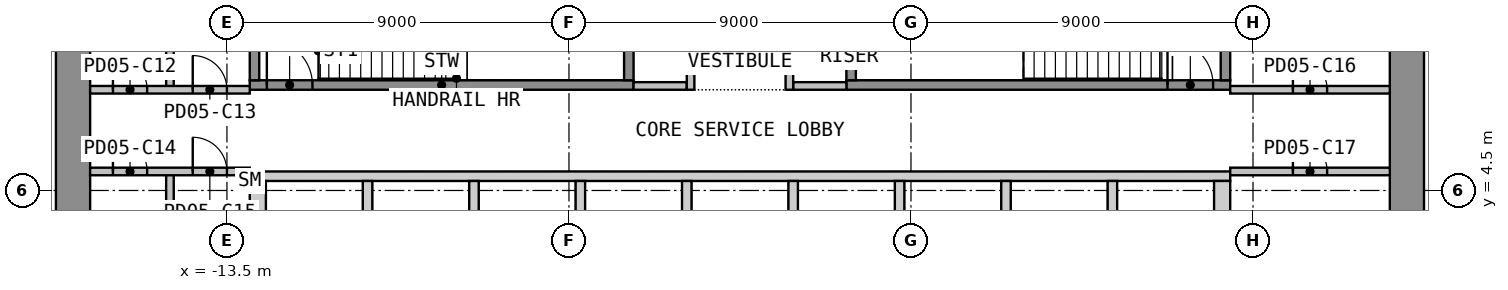
"""IFC4 building model, lengths in metres.
Left out: names, types, materials, properties, quantities, classifications, styles, units other than length and angle.
Written with IfcOpenShell. Run it as: python <this file> out.ifc"""

import sys

from ifc_helpers import new_model, si_unit, direction, frame, frame_2d, origin, place, context, subcontext, project, spatial, polyline, rectangle, outline, extrude, element, fill, save


model = new_model("IFC4")
c1 = context("Model", 3, precision=1e-05, world=origin(), true_north=direction((0.0, 1.0)))
c2 = subcontext(c1, "Body", "Model", "MODEL_VIEW")
j1 = project(units=[si_unit("LENGTHUNIT", "METRE"), si_unit("PLANEANGLEUNIT", "RADIAN")], contexts=[c1])
p1 = place(None, origin())
s1 = spatial("IfcSite", under=j1, at=p1, CompositionType="ELEMENT")
p2 = place(p1, origin())
s2 = spatial("IfcBuilding", under=s1, at=p2, CompositionType="ELEMENT")
p3 = place(p2, frame((0.0, 0.0, 25.2)))
s3 = spatial("IfcBuildingStorey", under=s2, at=p3, CompositionType="ELEMENT", Elevation=25.2)
p4 = place(p3, frame((-17.55, -12.6, 0.0), z_axis=(0.0, 0.0, 1.0), x_axis=(0.0, 1.0, 0.0)))
e1 = element("IfcWall", 1, at=p4, inside=s3, PredefinedType="SHEAR", context=c2, shape_type="SweptSolid", body=[
    extrude(rectangle(XDim=25.2, YDim=0.9, at=frame_2d((12.6, 0.0))), origin(), (0.0, 0.0, 1.0), 4.425),
])
p5 = place(p4, frame((11.4, 0.0, 0.0)))
e2 = element("IfcOpeningElement", 2, at=p5, cuts=e1, PredefinedType="OPENING", context=c2, shape_type="SweptSolid", body=[
    extrude(rectangle(XDim=2.4, YDim=2.1, at=frame_2d((1.2, 1.05))), frame((0.0, 0.46, 0.0), z_axis=(0.0, -1.0, 0.0), x_axis=(1.0, 0.0, 0.0)), (0.0, 0.0, 1.0), 0.92),
])
p6 = place(p3, frame((17.55, -12.6, 0.0), z_axis=(0.0, 0.0, 1.0), x_axis=(0.0, 1.0, 0.0)))
e3 = element("IfcWall", 3, at=p6, inside=s3, PredefinedType="SHEAR", context=c2, shape_type="SweptSolid", body=[
    extrude(rectangle(XDim=25.2, YDim=0.9, at=frame_2d((12.6, 0.0))), origin(), (0.0, 0.0, 1.0), 4.425),
])
p7 = place(p6, frame((11.4, 0.0, 0.0)))
e4 = element("IfcOpeningElement", 4, at=p7, cuts=e3, PredefinedType="OPENING", context=c2, shape_type="SweptSolid", body=[
    extrude(rectangle(XDim=2.4, YDim=2.1, at=frame_2d((1.2, 1.05))), frame((0.0, 0.46, 0.0), z_axis=(0.0, -1.0, 0.0), x_axis=(1.0, 0.0, 0.0)), (0.0, 0.0, 1.0), 0.92),
])
p8 = place(p3, origin())
e5 = element("IfcWall", 5, at=p8, inside=s3, PredefinedType="SHEAR", context=c2, shape_type="SweptSolid", body=[
    extrude(outline(polyline([(-12.9, 4.75), (12.9, 4.75), (12.9, 5.0), (-12.9, 5.0), (-12.9, 4.75)])), origin(), (0.0, 0.0, 1.0), 4.425),
])
p9 = place(p3, origin())
e6 = element("IfcWall", 6, at=p9, inside=s3, PredefinedType="SHEAR", context=c2, shape_type="SweptSolid", body=[
    extrude(outline(polyline([(-12.9, 2.05), (-12.475, 2.05), (-12.475, 4.75), (-12.9, 4.75), (-12.9, 2.05)])), origin(), (0.0, 0.0, 1.0), 4.425),
])
p10 = place(p3, origin())
e7 = element("IfcWall", 7, at=p10, inside=s3, PredefinedType="SHEAR", context=c2, shape_type="SweptSolid", body=[
    extrude(outline(polyline([(-9.925, 2.05), (-9.675, 2.05), (-9.675, 4.75), (-9.925, 4.75), (-9.925, 2.05)])), origin(), (0.0, 0.0, 1.0), 4.425),
])
p11 = place(p3, origin())
e8 = element("IfcWall", 8, at=p11, inside=s3, PredefinedType="SHEAR", context=c2, shape_type="SweptSolid", body=[
    extrude(outline(polyline([(-7.125, 2.05), (-6.875, 2.05), (-6.875, 4.75), (-7.125, 4.75), (-7.125, 2.05)])), origin(), (0.0, 0.0, 1.0), 4.425),
])
p12 = place(p3, origin())
e9 = element("IfcWall", 9, at=p12, inside=s3, PredefinedType="SHEAR", context=c2, shape_type="SweptSolid", body=[
    extrude(outline(polyline([(-4.325, 2.05), (-4.075, 2.05), (-4.075, 4.75), (-4.325, 4.75), (-4.325, 2.05)])), origin(), (0.0, 0.0, 1.0), 4.425),
])
p13 = place(p3, origin())
e10 = element("IfcWall", 10, at=p13, inside=s3, PredefinedType="SHEAR", context=c2, shape_type="SweptSolid", body=[
    extrude(outline(polyline([(-1.525, 2.05), (-1.275, 2.05), (-1.275, 4.75), (-1.525, 4.75), (-1.525, 2.05)])), origin(), (0.0, 0.0, 1.0), 4.425),
])
p14 = place(p3, origin())
e11 = element("IfcWall", 11, at=p14, inside=s3, PredefinedType="SHEAR", context=c2, shape_type="SweptSolid", body=[
    extrude(outline(polyline([(1.275, 2.05), (1.525, 2.05), (1.525, 4.75), (1.275, 4.75), (1.275, 2.05)])), origin(), (0.0, 0.0, 1.0), 4.425),
])
p15 = place(p3, origin())
e12 = element("IfcWall", 12, at=p15, inside=s3, PredefinedType="SHEAR", context=c2, shape_type="SweptSolid", body=[
    extrude(outline(polyline([(4.075, 2.05), (4.325, 2.05), (4.325, 4.75), (4.075, 4.75), (4.075, 2.05)])), origin(), (0.0, 0.0, 1.0), 4.425),
])
p16 = place(p3, origin())
e13 = element("IfcWall", 13, at=p16, inside=s3, PredefinedType="SHEAR", context=c2, shape_type="SweptSolid", body=[
    extrude(outline(polyline([(6.875, 2.05), (7.125, 2.05), (7.125, 4.75), (6.875, 4.75), (6.875, 2.05)])), origin(), (0.0, 0.0, 1.0), 4.425),
])
p17 = place(p3, origin())
e14 = element("IfcWall", 14, at=p17, inside=s3, PredefinedType="SHEAR", context=c2, shape_type="SweptSolid", body=[
    extrude(outline(polyline([(9.675, 2.05), (9.925, 2.05), (9.925, 4.75), (9.675, 4.75), (9.675, 2.05)])), origin(), (0.0, 0.0, 1.0), 4.425),
])
p18 = place(p3, origin())
e15 = element("IfcWall", 15, at=p18, inside=s3, PredefinedType="SHEAR", context=c2, shape_type="SweptSolid", body=[
    extrude(outline(polyline([(12.475, 2.05), (12.9, 2.05), (12.9, 4.75), (12.475, 4.75), (12.475, 2.05)])), origin(), (0.0, 0.0, 1.0), 4.425),
])
p19 = place(p3, frame((-12.9, 7.275, 0.0), z_axis=(0.0, 0.0, 1.0), x_axis=(1.0, 0.0, 0.0)))
e16 = element("IfcWall", 16, at=p19, inside=s3, PredefinedType="SHEAR", context=c2, shape_type="SweptSolid", body=[
    extrude(rectangle(XDim=10.1, YDim=0.25, at=frame_2d((5.05, 0.0))), origin(), (0.0, 0.0, 1.0), 4.425),
])
p20 = place(p19, frame((0.45, 0.0, 0.0)))
e17 = element("IfcOpeningElement", 17, at=p20, cuts=e16, PredefinedType="OPENING", context=c2, shape_type="SweptSolid", body=[
    extrude(rectangle(XDim=1.2, YDim=2.1, at=frame_2d((0.6, 1.05))), frame((0.0, 0.135, 0.0), z_axis=(0.0, -1.0, 0.0), x_axis=(1.0, 0.0, 0.0)), (0.0, 0.0, 1.0), 0.27),
])
for number, where, z_axis, x_axis in (
    (18, (-12.775, 7.4, 0.0), (0.0, 0.0, 1.0), (0.0, 1.0, 0.0)),
    (19, (-2.925, 7.4, 0.0), (0.0, 0.0, 1.0), (0.0, 1.0, 0.0)),
):
    element("IfcWall", number, at=place(p3, frame(where, z_axis=z_axis, x_axis=x_axis)), inside=s3, PredefinedType="SHEAR", context=c2, shape_type="SweptSolid", body=[
        extrude(rectangle(XDim=3.25, YDim=0.25, at=frame_2d((1.625, 0.0))), origin(), (0.0, 0.0, 1.0), 4.425),
    ])
p21 = place(p3, frame((2.8, 7.275, 0.0), z_axis=(0.0, 0.0, 1.0), x_axis=(1.0, 0.0, 0.0)))
e20 = element("IfcWall", 20, at=p21, inside=s3, PredefinedType="SHEAR", context=c2, shape_type="SweptSolid", body=[
    extrude(rectangle(XDim=10.1, YDim=0.25, at=frame_2d((5.05, 0.0))), origin(), (0.0, 0.0, 1.0), 4.425),
])
p22 = place(p21, frame((8.45, 0.0, 0.0)))
e21 = element("IfcOpeningElement", 21, at=p22, cuts=e20, PredefinedType="OPENING", context=c2, shape_type="SweptSolid", body=[
    extrude(rectangle(XDim=1.2, YDim=2.1, at=frame_2d((0.6, 1.05))), frame((0.0, 0.135, 0.0), z_axis=(0.0, -1.0, 0.0), x_axis=(1.0, 0.0, 0.0)), (0.0, 0.0, 1.0), 0.27),
])
for number, where, z_axis, x_axis in (
    (22, (2.925, 7.4, 0.0), (0.0, 0.0, 1.0), (0.0, 1.0, 0.0)),
    (23, (12.775, 7.4, 0.0), (0.0, 0.0, 1.0), (0.0, 1.0, 0.0)),
):
    element("IfcWall", number, at=place(p3, frame(where, z_axis=z_axis, x_axis=x_axis)), inside=s3, PredefinedType="SHEAR", context=c2, shape_type="SweptSolid", body=[
        extrude(rectangle(XDim=3.25, YDim=0.25, at=frame_2d((1.625, 0.0))), origin(), (0.0, 0.0, 1.0), 4.425),
    ])
for number, where, z_axis, x_axis in (
    (24, (-2.8, 7.25, 0.0), (0.0, 0.0, 1.0), (1.0, 0.0, 0.0)),
    (25, (1.4, 7.25, 0.0), (0.0, 0.0, 1.0), (1.0, 0.0, 0.0)),
):
    element("IfcWall", number, at=place(p3, frame(where, z_axis=z_axis, x_axis=x_axis)), inside=s3, PredefinedType="PARTITIONING", context=c2, shape_type="SweptSolid", body=[
        extrude(rectangle(XDim=1.4, YDim=0.2, at=frame_2d((0.7, 0.0))), origin(), (0.0, 0.0, 1.0), 4.425),
    ])
p23 = place(p3, frame((-1.3, 7.15, 0.0), z_axis=(0.0, 0.0, 1.0), x_axis=(0.0, 1.0, 0.0)))
e26 = element("IfcWall", 26, at=p23, inside=s3, PredefinedType="PARTITIONING", context=c2, shape_type="SweptSolid", body=[
    extrude(rectangle(XDim=5.45, YDim=0.2, at=frame_2d((2.725, 0.0))), origin(), (0.0, 0.0, 1.0), 4.425),
])
p24 = place(p23, frame((2.375, 0.0, 0.0)))
e27 = element("IfcOpeningElement", 27, at=p24, cuts=e26, PredefinedType="OPENING", context=c2, shape_type="SweptSolid", body=[
    extrude(rectangle(XDim=0.9, YDim=2.1, at=frame_2d((0.45, 1.05))), frame((0.0, 0.11, 0.0), z_axis=(0.0, -1.0, 0.0), x_axis=(1.0, 0.0, 0.0)), (0.0, 0.0, 1.0), 0.22),
])
p25 = place(p3, frame((1.3, 7.15, 0.0), z_axis=(0.0, 0.0, 1.0), x_axis=(0.0, 1.0, 0.0)))
e28 = element("IfcWall", 28, at=p25, inside=s3, PredefinedType="PARTITIONING", context=c2, shape_type="SweptSolid", body=[
    extrude(rectangle(XDim=5.45, YDim=0.2, at=frame_2d((2.725, 0.0))), origin(), (0.0, 0.0, 1.0), 4.425),
])
p26 = place(p25, frame((1.587, 0.0, 0.0)))
e29 = element("IfcOpeningElement", 29, at=p26, cuts=e28, PredefinedType="OPENING", context=c2, shape_type="SweptSolid", body=[
    extrude(rectangle(XDim=0.9, YDim=2.1, at=frame_2d((0.45, 1.05))), frame((0.0, 0.11, 0.0), z_axis=(0.0, -1.0, 0.0), x_axis=(1.0, 0.0, 0.0)), (0.0, 0.0, 1.0), 0.22),
])
p27 = place(p25, frame((4.212, 0.0, 0.0)))
e30 = element("IfcOpeningElement", 30, at=p27, cuts=e28, PredefinedType="OPENING", context=c2, shape_type="SweptSolid", body=[
    extrude(rectangle(XDim=0.9, YDim=2.1, at=frame_2d((0.45, 1.05))), frame((0.0, 0.11, 0.0), z_axis=(0.0, -1.0, 0.0), x_axis=(1.0, 0.0, 0.0)), (0.0, 0.0, 1.0), 0.22),
])
p28 = place(p3, frame((-15.0, 7.15, 0.0), z_axis=(0.0, 0.0, 1.0), x_axis=(0.0, 1.0, 0.0)))
e31 = element("IfcWall", 31, at=p28, inside=s3, PredefinedType="PARTITIONING", context=c2, shape_type="SweptSolid", body=[
    extrude(rectangle(XDim=5.45, YDim=0.2, at=frame_2d((2.725, 0.0))), origin(), (0.0, 0.0, 1.0), 4.425),
])
p29 = place(p3, frame((-17.1, 7.15, 0.0), z_axis=(0.0, 0.0, 1.0), x_axis=(1.0, 0.0, 0.0)))
e32 = element("IfcWall", 32, at=p29, inside=s3, PredefinedType="PARTITIONING", context=c2, shape_type="SweptSolid", body=[
    extrude(rectangle(XDim=4.2, YDim=0.2, at=frame_2d((2.1, 0.0))), origin(), (0.0, 0.0, 1.0), 4.425),
])
p30 = place(p29, frame((0.6, 0.0, 0.0)))
e33 = element("IfcOpeningElement", 33, at=p30, cuts=e32, PredefinedType="OPENING", context=c2, shape_type="SweptSolid", body=[
    extrude(rectangle(XDim=0.9, YDim=2.1, at=frame_2d((0.45, 1.05))), frame((0.0, 0.11, 0.0), z_axis=(0.0, -1.0, 0.0), x_axis=(1.0, 0.0, 0.0)), (0.0, 0.0, 1.0), 0.22),
])
p31 = place(p29, frame((2.7, 0.0, 0.0)))
e34 = element("IfcOpeningElement", 34, at=p31, cuts=e32, PredefinedType="OPENING", context=c2, shape_type="SweptSolid", body=[
    extrude(rectangle(XDim=0.9, YDim=2.1, at=frame_2d((0.45, 1.05))), frame((0.0, 0.11, 0.0), z_axis=(0.0, -1.0, 0.0), x_axis=(1.0, 0.0, 0.0)), (0.0, 0.0, 1.0), 0.22),
])
p32 = place(p3, frame((-15.0, 1.8, 0.0), z_axis=(0.0, 0.0, 1.0), x_axis=(0.0, 1.0, 0.0)))
e35 = element("IfcWall", 35, at=p32, inside=s3, PredefinedType="PARTITIONING", context=c2, shape_type="SweptSolid", body=[
    extrude(rectangle(XDim=3.2, YDim=0.2, at=frame_2d((1.6, 0.0))), origin(), (0.0, 0.0, 1.0), 4.425),
])
p33 = place(p3, frame((-17.1, 5.0, 0.0), z_axis=(0.0, 0.0, 1.0), x_axis=(1.0, 0.0, 0.0)))
e36 = element("IfcWall", 36, at=p33, inside=s3, PredefinedType="PARTITIONING", context=c2, shape_type="SweptSolid", body=[
    extrude(rectangle(XDim=4.2, YDim=0.2, at=frame_2d((2.1, 0.0))), origin(), (0.0, 0.0, 1.0), 4.425),
])
p34 = place(p33, frame((0.6, 0.0, 0.0)))
e37 = element("IfcOpeningElement", 37, at=p34, cuts=e36, PredefinedType="OPENING", context=c2, shape_type="SweptSolid", body=[
    extrude(rectangle(XDim=0.9, YDim=2.1, at=frame_2d((0.45, 1.05))), frame((0.0, 0.11, 0.0), z_axis=(0.0, -1.0, 0.0), x_axis=(1.0, 0.0, 0.0)), (0.0, 0.0, 1.0), 0.22),
])
p35 = place(p33, frame((2.7, 0.0, 0.0)))
e38 = element("IfcOpeningElement", 38, at=p35, cuts=e36, PredefinedType="OPENING", context=c2, shape_type="SweptSolid", body=[
    extrude(rectangle(XDim=0.9, YDim=2.1, at=frame_2d((0.45, 1.05))), frame((0.0, 0.11, 0.0), z_axis=(0.0, -1.0, 0.0), x_axis=(1.0, 0.0, 0.0)), (0.0, 0.0, 1.0), 0.22),
])
p36 = place(p3, frame((12.9, 7.15, 0.0), z_axis=(0.0, 0.0, 1.0), x_axis=(1.0, 0.0, 0.0)))
e39 = element("IfcWall", 39, at=p36, inside=s3, PredefinedType="PARTITIONING", context=c2, shape_type="SweptSolid", body=[
    extrude(rectangle(XDim=4.2, YDim=0.2, at=frame_2d((2.1, 0.0))), origin(), (0.0, 0.0, 1.0), 4.425),
])
p37 = place(p36, frame((1.65, 0.0, 0.0)))
e40 = element("IfcOpeningElement", 40, at=p37, cuts=e39, PredefinedType="OPENING", context=c2, shape_type="SweptSolid", body=[
    extrude(rectangle(XDim=0.9, YDim=2.1, at=frame_2d((0.45, 1.05))), frame((0.0, 0.11, 0.0), z_axis=(0.0, -1.0, 0.0), x_axis=(1.0, 0.0, 0.0)), (0.0, 0.0, 1.0), 0.22),
])
p38 = place(p3, frame((12.9, 5.0, 0.0), z_axis=(0.0, 0.0, 1.0), x_axis=(1.0, 0.0, 0.0)))
e41 = element("IfcWall", 41, at=p38, inside=s3, PredefinedType="PARTITIONING", context=c2, shape_type="SweptSolid", body=[
    extrude(rectangle(XDim=4.2, YDim=0.2, at=frame_2d((2.1, 0.0))), origin(), (0.0, 0.0, 1.0), 4.425),
])
p39 = place(p38, frame((1.65, 0.0, 0.0)))
e42 = element("IfcOpeningElement", 42, at=p39, cuts=e41, PredefinedType="OPENING", context=c2, shape_type="SweptSolid", body=[
    extrude(rectangle(XDim=0.9, YDim=2.1, at=frame_2d((0.45, 1.05))), frame((0.0, 0.11, 0.0), z_axis=(0.0, -1.0, 0.0), x_axis=(1.0, 0.0, 0.0)), (0.0, 0.0, 1.0), 0.22),
])
p40 = place(p20, origin())
e43 = element("IfcDoor", 43, at=p40, inside=s3, OperationType="SINGLE_SWING_LEFT", PredefinedType="DOOR", context=c2, shape_type="SweptSolid", body=[
    extrude(rectangle(XDim=1.2, YDim=2.1, at=frame_2d((0.6, 1.05))), frame((0.0, 0.025, 0.0), z_axis=(0.0, -1.0, 0.0), x_axis=(1.0, 0.0, 0.0)), (0.0, 0.0, 1.0), 0.05),
])
fill(e17, e43)
p41 = place(p22, origin())
e44 = element("IfcDoor", 44, at=p41, inside=s3, OperationType="SINGLE_SWING_LEFT", PredefinedType="DOOR", context=c2, shape_type="SweptSolid", body=[
    extrude(rectangle(XDim=1.2, YDim=2.1, at=frame_2d((0.6, 1.05))), frame((0.0, 0.025, 0.0), z_axis=(0.0, -1.0, 0.0), x_axis=(1.0, 0.0, 0.0)), (0.0, 0.0, 1.0), 0.05),
])
fill(e21, e44)
p42 = place(p30, origin())
e45 = element("IfcDoor", 45, at=p42, inside=s3, OperationType="SINGLE_SWING_LEFT", PredefinedType="DOOR", context=c2, shape_type="SweptSolid", body=[
    extrude(rectangle(XDim=0.9, YDim=2.1, at=frame_2d((0.45, 1.05))), frame((0.0, 0.025, 0.0), z_axis=(0.0, -1.0, 0.0), x_axis=(1.0, 0.0, 0.0)), (0.0, 0.0, 1.0), 0.05),
])
fill(e33, e45)
p43 = place(p31, origin())
e46 = element("IfcDoor", 46, at=p43, inside=s3, OperationType="SINGLE_SWING_LEFT", PredefinedType="DOOR", context=c2, shape_type="SweptSolid", body=[
    extrude(rectangle(XDim=0.9, YDim=2.1, at=frame_2d((0.45, 1.05))), frame((0.0, 0.025, 0.0), z_axis=(0.0, -1.0, 0.0), x_axis=(1.0, 0.0, 0.0)), (0.0, 0.0, 1.0), 0.05),
])
fill(e34, e46)
p44 = place(p34, origin())
e47 = element("IfcDoor", 47, at=p44, inside=s3, OperationType="SINGLE_SWING_LEFT", PredefinedType="DOOR", context=c2, shape_type="SweptSolid", body=[
    extrude(rectangle(XDim=0.9, YDim=2.1, at=frame_2d((0.45, 1.05))), frame((0.0, 0.025, 0.0), z_axis=(0.0, -1.0, 0.0), x_axis=(1.0, 0.0, 0.0)), (0.0, 0.0, 1.0), 0.05),
])
fill(e37, e47)
p45 = place(p35, origin())
e48 = element("IfcDoor", 48, at=p45, inside=s3, OperationType="SINGLE_SWING_LEFT", PredefinedType="DOOR", context=c2, shape_type="SweptSolid", body=[
    extrude(rectangle(XDim=0.9, YDim=2.1, at=frame_2d((0.45, 1.05))), frame((0.0, 0.025, 0.0), z_axis=(0.0, -1.0, 0.0), x_axis=(1.0, 0.0, 0.0)), (0.0, 0.0, 1.0), 0.05),
])
fill(e38, e48)
p46 = place(p37, origin())
e49 = element("IfcDoor", 49, at=p46, inside=s3, OperationType="SINGLE_SWING_LEFT", PredefinedType="DOOR", context=c2, shape_type="SweptSolid", body=[
    extrude(rectangle(XDim=0.9, YDim=2.1, at=frame_2d((0.45, 1.05))), frame((0.0, 0.025, 0.0), z_axis=(0.0, -1.0, 0.0), x_axis=(1.0, 0.0, 0.0)), (0.0, 0.0, 1.0), 0.05),
])
fill(e40, e49)
p47 = place(p39, origin())
e50 = element("IfcDoor", 50, at=p47, inside=s3, OperationType="SINGLE_SWING_LEFT", PredefinedType="DOOR", context=c2, shape_type="SweptSolid", body=[
    extrude(rectangle(XDim=0.9, YDim=2.1, at=frame_2d((0.45, 1.05))), frame((0.0, 0.025, 0.0), z_axis=(0.0, -1.0, 0.0), x_axis=(1.0, 0.0, 0.0)), (0.0, 0.0, 1.0), 0.05),
])
fill(e42, e50)
save(model, sys.argv[1])
